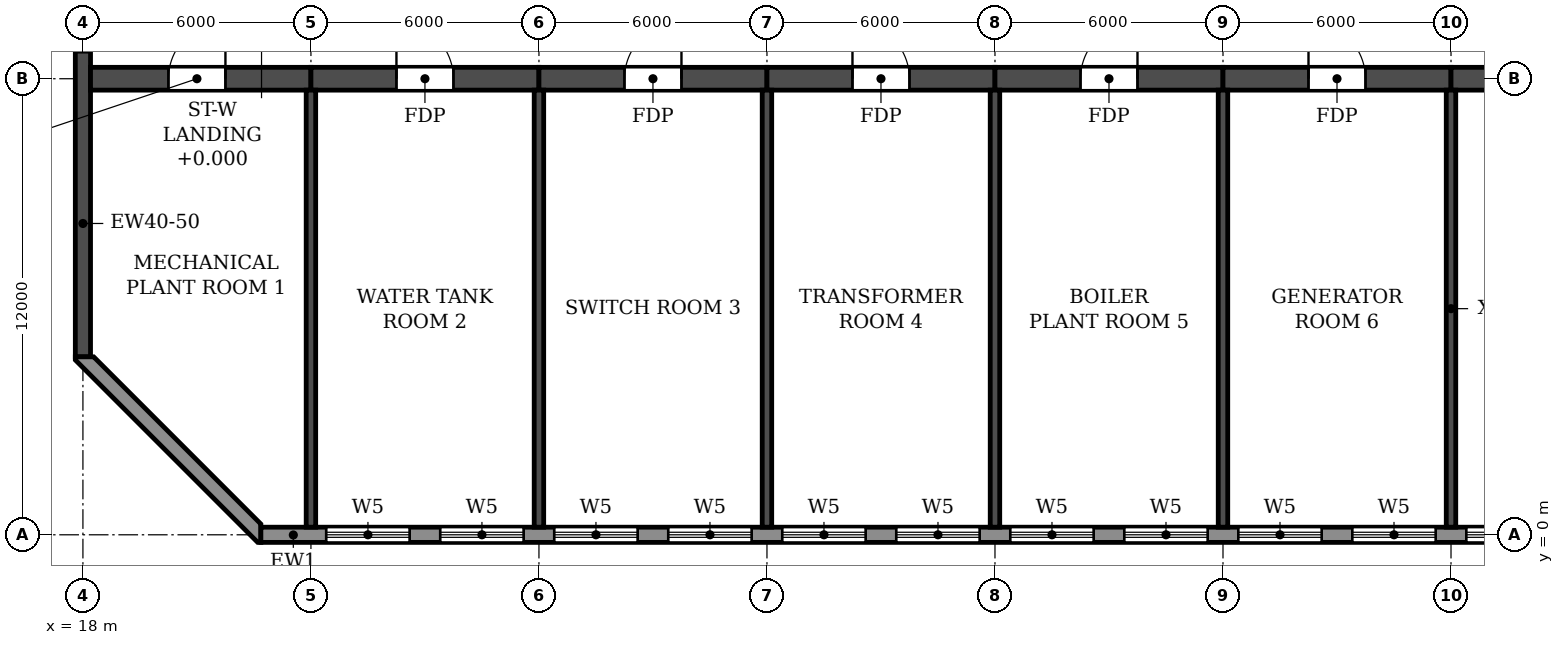
"""IFC4 building model, lengths in metres.
Left out: names, types, materials, properties, quantities, classifications, styles, units other than length and angle.
Written with IfcOpenShell. Run it as: python <this file> out.ifc"""

import sys

from ifc_helpers import new_model, si_unit, direction, frame, frame_2d, origin, place, context, subcontext, project, spatial, polyline, rectangle, outline, extrude, element, fill, save


model = new_model("IFC4")
c1 = context("Model", 3, precision=1e-05, world=origin(), true_north=direction((0.0, 1.0)))
c2 = subcontext(c1, "Body", "Model", "MODEL_VIEW")
j1 = project(units=[si_unit("LENGTHUNIT", "METRE"), si_unit("PLANEANGLEUNIT", "RADIAN")], contexts=[c1])
p1 = place(None, origin())
s1 = spatial("IfcSite", under=j1, at=p1, CompositionType="ELEMENT")
p2 = place(p1, origin())
s2 = spatial("IfcBuilding", under=s1, at=p2, CompositionType="ELEMENT")
p3 = place(p2, frame((0.0, 0.0, 214.8)))
s3 = spatial("IfcBuildingStorey", under=s2, at=p3, CompositionType="ELEMENT", Elevation=214.8)
for number, where, z_axis, x_axis in (
    (1, (24.0, 0.2, 0.0), (0.0, 0.0, 1.0), (0.0, 1.0, 0.0)),
    (2, (30.0, 0.2, 0.0), (0.0, 0.0, 1.0), (0.0, 1.0, 0.0)),
    (3, (36.0, 0.2, 0.0), (0.0, 0.0, 1.0), (0.0, 1.0, 0.0)),
    (4, (42.0, 0.2, 0.0), (0.0, 0.0, 1.0), (0.0, 1.0, 0.0)),
    (5, (48.0, 0.2, 0.0), (0.0, 0.0, 1.0), (0.0, 1.0, 0.0)),
    (6, (54.0, 0.2, 0.0), (0.0, 0.0, 1.0), (0.0, 1.0, 0.0)),
):
    element("IfcWall", number, at=place(p3, frame(where, z_axis=z_axis, x_axis=x_axis)), inside=s3, PredefinedType="SHEAR", context=c2, shape_type="SweptSolid", body=[
        extrude(rectangle(XDim=11.5, YDim=0.25, at=frame_2d((5.75, 0.0))), origin(), (0.0, 0.0, 1.0), 6.38),
    ])
p4 = place(p3, frame((18.0, 4.683, 0.0), z_axis=(0.0, 0.0, 1.0), x_axis=(0.0, 1.0, 0.0)))
e7 = element("IfcWall", 7, at=p4, inside=s3, PredefinedType="SHEAR", context=c2, shape_type="SweptSolid", body=[
    extrude(rectangle(XDim=31.834, YDim=0.4, at=frame_2d((15.917, 0.0))), origin(), (0.0, 0.0, 1.0), 6.38),
])
p5 = place(p4, frame((23.817, 0.0, 0.9)))
e8 = element("IfcOpeningElement", 8, at=p5, cuts=e7, PredefinedType="OPENING", context=c2, shape_type="SweptSolid", body=[
    extrude(rectangle(XDim=1.2, YDim=1.5, at=frame_2d((0.6, 0.75))), frame((0.0, 0.21, 0.0), z_axis=(0.0, -1.0, 0.0), x_axis=(1.0, 0.0, 0.0)), (0.0, 0.0, 1.0), 0.42),
])
p6 = place(p4, frame((8.017, 0.0, 0.9)))
e9 = element("IfcOpeningElement", 9, at=p6, cuts=e7, PredefinedType="OPENING", context=c2, shape_type="SweptSolid", body=[
    extrude(rectangle(XDim=1.2, YDim=1.5, at=frame_2d((0.6, 0.75))), frame((0.0, 0.21, 0.0), z_axis=(0.0, -1.0, 0.0), x_axis=(1.0, 0.0, 0.0)), (0.0, 0.0, 1.0), 0.42),
])
p7 = place(p4, frame((15.917, 0.0, 0.9)))
e10 = element("IfcOpeningElement", 10, at=p7, cuts=e7, PredefinedType="OPENING", context=c2, shape_type="SweptSolid", body=[
    extrude(rectangle(XDim=1.2, YDim=1.5, at=frame_2d((0.6, 0.75))), frame((0.0, 0.21, 0.0), z_axis=(0.0, -1.0, 0.0), x_axis=(1.0, 0.0, 0.0)), (0.0, 0.0, 1.0), 0.42),
])
p8 = place(p3, frame((18.2, 12.0, 0.0), z_axis=(0.0, 0.0, 1.0), x_axis=(1.0, 0.0, 0.0)))
e11 = element("IfcWall", 11, at=p8, inside=s3, PredefinedType="SHEAR", context=c2, shape_type="SweptSolid", body=[
    extrude(rectangle(XDim=5.8, YDim=0.6, at=frame_2d((2.9, 0.0))), origin(), (0.0, 0.0, 1.0), 6.38),
])
p9 = place(p8, frame((2.05, 0.0, 0.0)))
e12 = element("IfcOpeningElement", 12, at=p9, cuts=e11, PredefinedType="OPENING", context=c2, shape_type="SweptSolid", body=[
    extrude(rectangle(XDim=1.5, YDim=2.1, at=frame_2d((0.75, 1.05))), frame((0.0, 0.31, 0.0), z_axis=(0.0, -1.0, 0.0), x_axis=(1.0, 0.0, 0.0)), (0.0, 0.0, 1.0), 0.62),
])
p10 = place(p3, frame((24.0, 12.0, 0.0), z_axis=(0.0, 0.0, 1.0), x_axis=(1.0, 0.0, 0.0)))
e13 = element("IfcWall", 13, at=p10, inside=s3, PredefinedType="SHEAR", context=c2, shape_type="SweptSolid", body=[
    extrude(rectangle(XDim=6.0, YDim=0.6, at=frame_2d((3.0, 0.0))), origin(), (0.0, 0.0, 1.0), 6.38),
])
p11 = place(p10, frame((2.25, 0.0, 0.0)))
e14 = element("IfcOpeningElement", 14, at=p11, cuts=e13, PredefinedType="OPENING", context=c2, shape_type="SweptSolid", body=[
    extrude(rectangle(XDim=1.5, YDim=2.1, at=frame_2d((0.75, 1.05))), frame((0.0, 0.31, 0.0), z_axis=(0.0, -1.0, 0.0), x_axis=(1.0, 0.0, 0.0)), (0.0, 0.0, 1.0), 0.62),
])
p12 = place(p3, frame((30.0, 12.0, 0.0), z_axis=(0.0, 0.0, 1.0), x_axis=(1.0, 0.0, 0.0)))
e15 = element("IfcWall", 15, at=p12, inside=s3, PredefinedType="SHEAR", context=c2, shape_type="SweptSolid", body=[
    extrude(rectangle(XDim=6.0, YDim=0.6, at=frame_2d((3.0, 0.0))), origin(), (0.0, 0.0, 1.0), 6.38),
])
p13 = place(p12, frame((2.25, 0.0, 0.0)))
e16 = element("IfcOpeningElement", 16, at=p13, cuts=e15, PredefinedType="OPENING", context=c2, shape_type="SweptSolid", body=[
    extrude(rectangle(XDim=1.5, YDim=2.1, at=frame_2d((0.75, 1.05))), frame((0.0, 0.31, 0.0), z_axis=(0.0, -1.0, 0.0), x_axis=(1.0, 0.0, 0.0)), (0.0, 0.0, 1.0), 0.62),
])
p14 = place(p3, frame((36.0, 12.0, 0.0), z_axis=(0.0, 0.0, 1.0), x_axis=(1.0, 0.0, 0.0)))
e17 = element("IfcWall", 17, at=p14, inside=s3, PredefinedType="SHEAR", context=c2, shape_type="SweptSolid", body=[
    extrude(rectangle(XDim=6.0, YDim=0.6, at=frame_2d((3.0, 0.0))), origin(), (0.0, 0.0, 1.0), 6.38),
])
p15 = place(p14, frame((2.25, 0.0, 0.0)))
e18 = element("IfcOpeningElement", 18, at=p15, cuts=e17, PredefinedType="OPENING", context=c2, shape_type="SweptSolid", body=[
    extrude(rectangle(XDim=1.5, YDim=2.1, at=frame_2d((0.75, 1.05))), frame((0.0, 0.31, 0.0), z_axis=(0.0, -1.0, 0.0), x_axis=(1.0, 0.0, 0.0)), (0.0, 0.0, 1.0), 0.62),
])
p16 = place(p3, frame((42.0, 12.0, 0.0), z_axis=(0.0, 0.0, 1.0), x_axis=(1.0, 0.0, 0.0)))
e19 = element("IfcWall", 19, at=p16, inside=s3, PredefinedType="SHEAR", context=c2, shape_type="SweptSolid", body=[
    extrude(rectangle(XDim=6.0, YDim=0.6, at=frame_2d((3.0, 0.0))), origin(), (0.0, 0.0, 1.0), 6.38),
])
p17 = place(p16, frame((2.25, 0.0, 0.0)))
e20 = element("IfcOpeningElement", 20, at=p17, cuts=e19, PredefinedType="OPENING", context=c2, shape_type="SweptSolid", body=[
    extrude(rectangle(XDim=1.5, YDim=2.1, at=frame_2d((0.75, 1.05))), frame((0.0, 0.31, 0.0), z_axis=(0.0, -1.0, 0.0), x_axis=(1.0, 0.0, 0.0)), (0.0, 0.0, 1.0), 0.62),
])
p18 = place(p3, frame((48.0, 12.0, 0.0), z_axis=(0.0, 0.0, 1.0), x_axis=(1.0, 0.0, 0.0)))
e21 = element("IfcWall", 21, at=p18, inside=s3, PredefinedType="SHEAR", context=c2, shape_type="SweptSolid", body=[
    extrude(rectangle(XDim=6.0, YDim=0.6, at=frame_2d((3.0, 0.0))), origin(), (0.0, 0.0, 1.0), 6.38),
])
p19 = place(p18, frame((2.25, 0.0, 0.0)))
e22 = element("IfcOpeningElement", 22, at=p19, cuts=e21, PredefinedType="OPENING", context=c2, shape_type="SweptSolid", body=[
    extrude(rectangle(XDim=1.5, YDim=2.1, at=frame_2d((0.75, 1.05))), frame((0.0, 0.31, 0.0), z_axis=(0.0, -1.0, 0.0), x_axis=(1.0, 0.0, 0.0)), (0.0, 0.0, 1.0), 0.62),
])
p20 = place(p3, frame((54.0, 12.0, 0.0), z_axis=(0.0, 0.0, 1.0), x_axis=(1.0, 0.0, 0.0)))
e23 = element("IfcWall", 23, at=p20, inside=s3, PredefinedType="SHEAR", context=c2, shape_type="SweptSolid", body=[
    extrude(rectangle(XDim=6.0, YDim=0.6, at=frame_2d((3.0, 0.0))), origin(), (0.0, 0.0, 1.0), 6.38),
])
p21 = place(p20, frame((2.25, 0.0, 0.0)))
e24 = element("IfcOpeningElement", 24, at=p21, cuts=e23, PredefinedType="OPENING", context=c2, shape_type="SweptSolid", body=[
    extrude(rectangle(XDim=1.5, YDim=2.1, at=frame_2d((0.75, 1.05))), frame((0.0, 0.31, 0.0), z_axis=(0.0, -1.0, 0.0), x_axis=(1.0, 0.0, 0.0)), (0.0, 0.0, 1.0), 0.62),
])
p22 = place(p3, frame((22.683, 0.0, 0.0), z_axis=(0.0, 0.0, 1.0), x_axis=(1.0, 0.0, 0.0)))
e25 = element("IfcWall", 25, at=p22, inside=s3, PredefinedType="STANDARD", context=c2, shape_type="SweptSolid", body=[
    extrude(rectangle(XDim=56.634, YDim=0.4, at=frame_2d((28.317, 0.0))), origin(), (0.0, 0.0, 1.0), 6.38),
])
p23 = place(p22, frame((1.717, 0.0, 0.6)))
e26 = element("IfcOpeningElement", 26, at=p23, cuts=e25, PredefinedType="OPENING", context=c2, shape_type="SweptSolid", body=[
    extrude(rectangle(XDim=2.2, YDim=2.4, at=frame_2d((1.1, 1.2))), frame((0.0, 0.21, 0.0), z_axis=(0.0, -1.0, 0.0), x_axis=(1.0, 0.0, 0.0)), (0.0, 0.0, 1.0), 0.42),
])
p24 = place(p22, frame((4.717, 0.0, 0.6)))
e27 = element("IfcOpeningElement", 27, at=p24, cuts=e25, PredefinedType="OPENING", context=c2, shape_type="SweptSolid", body=[
    extrude(rectangle(XDim=2.2, YDim=2.4, at=frame_2d((1.1, 1.2))), frame((0.0, 0.21, 0.0), z_axis=(0.0, -1.0, 0.0), x_axis=(1.0, 0.0, 0.0)), (0.0, 0.0, 1.0), 0.42),
])
p25 = place(p22, frame((7.717, 0.0, 0.6)))
e28 = element("IfcOpeningElement", 28, at=p25, cuts=e25, PredefinedType="OPENING", context=c2, shape_type="SweptSolid", body=[
    extrude(rectangle(XDim=2.2, YDim=2.4, at=frame_2d((1.1, 1.2))), frame((0.0, 0.21, 0.0), z_axis=(0.0, -1.0, 0.0), x_axis=(1.0, 0.0, 0.0)), (0.0, 0.0, 1.0), 0.42),
])
p26 = place(p22, frame((10.717, 0.0, 0.6)))
e29 = element("IfcOpeningElement", 29, at=p26, cuts=e25, PredefinedType="OPENING", context=c2, shape_type="SweptSolid", body=[
    extrude(rectangle(XDim=2.2, YDim=2.4, at=frame_2d((1.1, 1.2))), frame((0.0, 0.21, 0.0), z_axis=(0.0, -1.0, 0.0), x_axis=(1.0, 0.0, 0.0)), (0.0, 0.0, 1.0), 0.42),
])
p27 = place(p22, frame((13.717, 0.0, 0.6)))
e30 = element("IfcOpeningElement", 30, at=p27, cuts=e25, PredefinedType="OPENING", context=c2, shape_type="SweptSolid", body=[
    extrude(rectangle(XDim=2.2, YDim=2.4, at=frame_2d((1.1, 1.2))), frame((0.0, 0.21, 0.0), z_axis=(0.0, -1.0, 0.0), x_axis=(1.0, 0.0, 0.0)), (0.0, 0.0, 1.0), 0.42),
])
p28 = place(p22, frame((16.717, 0.0, 0.6)))
e31 = element("IfcOpeningElement", 31, at=p28, cuts=e25, PredefinedType="OPENING", context=c2, shape_type="SweptSolid", body=[
    extrude(rectangle(XDim=2.2, YDim=2.4, at=frame_2d((1.1, 1.2))), frame((0.0, 0.21, 0.0), z_axis=(0.0, -1.0, 0.0), x_axis=(1.0, 0.0, 0.0)), (0.0, 0.0, 1.0), 0.42),
])
p29 = place(p22, frame((19.717, 0.0, 0.6)))
e32 = element("IfcOpeningElement", 32, at=p29, cuts=e25, PredefinedType="OPENING", context=c2, shape_type="SweptSolid", body=[
    extrude(rectangle(XDim=2.2, YDim=2.4, at=frame_2d((1.1, 1.2))), frame((0.0, 0.21, 0.0), z_axis=(0.0, -1.0, 0.0), x_axis=(1.0, 0.0, 0.0)), (0.0, 0.0, 1.0), 0.42),
])
p30 = place(p22, frame((22.717, 0.0, 0.6)))
e33 = element("IfcOpeningElement", 33, at=p30, cuts=e25, PredefinedType="OPENING", context=c2, shape_type="SweptSolid", body=[
    extrude(rectangle(XDim=2.2, YDim=2.4, at=frame_2d((1.1, 1.2))), frame((0.0, 0.21, 0.0), z_axis=(0.0, -1.0, 0.0), x_axis=(1.0, 0.0, 0.0)), (0.0, 0.0, 1.0), 0.42),
])
p31 = place(p22, frame((25.717, 0.0, 0.6)))
e34 = element("IfcOpeningElement", 34, at=p31, cuts=e25, PredefinedType="OPENING", context=c2, shape_type="SweptSolid", body=[
    extrude(rectangle(XDim=2.2, YDim=2.4, at=frame_2d((1.1, 1.2))), frame((0.0, 0.21, 0.0), z_axis=(0.0, -1.0, 0.0), x_axis=(1.0, 0.0, 0.0)), (0.0, 0.0, 1.0), 0.42),
])
p32 = place(p22, frame((28.717, 0.0, 0.6)))
e35 = element("IfcOpeningElement", 35, at=p32, cuts=e25, PredefinedType="OPENING", context=c2, shape_type="SweptSolid", body=[
    extrude(rectangle(XDim=2.2, YDim=2.4, at=frame_2d((1.1, 1.2))), frame((0.0, 0.21, 0.0), z_axis=(0.0, -1.0, 0.0), x_axis=(1.0, 0.0, 0.0)), (0.0, 0.0, 1.0), 0.42),
])
p33 = place(p22, frame((31.717, 0.0, 0.6)))
e36 = element("IfcOpeningElement", 36, at=p33, cuts=e25, PredefinedType="OPENING", context=c2, shape_type="SweptSolid", body=[
    extrude(rectangle(XDim=2.2, YDim=2.4, at=frame_2d((1.1, 1.2))), frame((0.0, 0.21, 0.0), z_axis=(0.0, -1.0, 0.0), x_axis=(1.0, 0.0, 0.0)), (0.0, 0.0, 1.0), 0.42),
])
p34 = place(p22, frame((34.717, 0.0, 0.6)))
e37 = element("IfcOpeningElement", 37, at=p34, cuts=e25, PredefinedType="OPENING", context=c2, shape_type="SweptSolid", body=[
    extrude(rectangle(XDim=2.2, YDim=2.4, at=frame_2d((1.1, 1.2))), frame((0.0, 0.21, 0.0), z_axis=(0.0, -1.0, 0.0), x_axis=(1.0, 0.0, 0.0)), (0.0, 0.0, 1.0), 0.42),
])
p35 = place(p22, frame((37.717, 0.0, 0.6)))
e38 = element("IfcOpeningElement", 38, at=p35, cuts=e25, PredefinedType="OPENING", context=c2, shape_type="SweptSolid", body=[
    extrude(rectangle(XDim=2.2, YDim=2.4, at=frame_2d((1.1, 1.2))), frame((0.0, 0.21, 0.0), z_axis=(0.0, -1.0, 0.0), x_axis=(1.0, 0.0, 0.0)), (0.0, 0.0, 1.0), 0.42),
])
p36 = place(p22, frame((40.717, 0.0, 0.6)))
e39 = element("IfcOpeningElement", 39, at=p36, cuts=e25, PredefinedType="OPENING", context=c2, shape_type="SweptSolid", body=[
    extrude(rectangle(XDim=2.2, YDim=2.4, at=frame_2d((1.1, 1.2))), frame((0.0, 0.21, 0.0), z_axis=(0.0, -1.0, 0.0), x_axis=(1.0, 0.0, 0.0)), (0.0, 0.0, 1.0), 0.42),
])
p37 = place(p22, frame((43.717, 0.0, 0.6)))
e40 = element("IfcOpeningElement", 40, at=p37, cuts=e25, PredefinedType="OPENING", context=c2, shape_type="SweptSolid", body=[
    extrude(rectangle(XDim=2.2, YDim=2.4, at=frame_2d((1.1, 1.2))), frame((0.0, 0.21, 0.0), z_axis=(0.0, -1.0, 0.0), x_axis=(1.0, 0.0, 0.0)), (0.0, 0.0, 1.0), 0.42),
])
p38 = place(p22, frame((46.717, 0.0, 0.6)))
e41 = element("IfcOpeningElement", 41, at=p38, cuts=e25, PredefinedType="OPENING", context=c2, shape_type="SweptSolid", body=[
    extrude(rectangle(XDim=2.2, YDim=2.4, at=frame_2d((1.1, 1.2))), frame((0.0, 0.21, 0.0), z_axis=(0.0, -1.0, 0.0), x_axis=(1.0, 0.0, 0.0)), (0.0, 0.0, 1.0), 0.42),
])
p39 = place(p22, frame((49.717, 0.0, 0.6)))
e42 = element("IfcOpeningElement", 42, at=p39, cuts=e25, PredefinedType="OPENING", context=c2, shape_type="SweptSolid", body=[
    extrude(rectangle(XDim=2.2, YDim=2.4, at=frame_2d((1.1, 1.2))), frame((0.0, 0.21, 0.0), z_axis=(0.0, -1.0, 0.0), x_axis=(1.0, 0.0, 0.0)), (0.0, 0.0, 1.0), 0.42),
])
p40 = place(p22, frame((52.717, 0.0, 0.6)))
e43 = element("IfcOpeningElement", 43, at=p40, cuts=e25, PredefinedType="OPENING", context=c2, shape_type="SweptSolid", body=[
    extrude(rectangle(XDim=2.2, YDim=2.4, at=frame_2d((1.1, 1.2))), frame((0.0, 0.21, 0.0), z_axis=(0.0, -1.0, 0.0), x_axis=(1.0, 0.0, 0.0)), (0.0, 0.0, 1.0), 0.42),
])
p41 = place(p3, origin())
e44 = element("IfcWall", 44, at=p41, inside=s3, PredefinedType="STANDARD", context=c2, shape_type="SweptSolid", body=[
    extrude(outline(polyline([(17.8, 4.683), (17.8, 4.6), (22.6, -0.2), (22.683, -0.2), (22.683, 0.283), (18.283, 4.683), (17.8, 4.683)])), origin(), (0.0, 0.0, 1.0), 6.38),
])
p42 = place(p23, origin())
e45 = element("IfcWindow", 45, at=p42, inside=s3, PartitioningType="TRIPLE_PANEL_HORIZONTAL", PredefinedType="WINDOW", context=c2, shape_type="SweptSolid", body=[
    extrude(rectangle(XDim=2.2, YDim=2.4, at=frame_2d((1.1, 1.2))), frame((0.0, 0.03, 0.0), z_axis=(0.0, -1.0, 0.0), x_axis=(1.0, 0.0, 0.0)), (0.0, 0.0, 1.0), 0.06),
])
fill(e26, e45)
p43 = place(p24, origin())
e46 = element("IfcWindow", 46, at=p43, inside=s3, PartitioningType="TRIPLE_PANEL_HORIZONTAL", PredefinedType="WINDOW", context=c2, shape_type="SweptSolid", body=[
    extrude(rectangle(XDim=2.2, YDim=2.4, at=frame_2d((1.1, 1.2))), frame((0.0, 0.03, 0.0), z_axis=(0.0, -1.0, 0.0), x_axis=(1.0, 0.0, 0.0)), (0.0, 0.0, 1.0), 0.06),
])
fill(e27, e46)
p44 = place(p25, origin())
e47 = element("IfcWindow", 47, at=p44, inside=s3, PartitioningType="TRIPLE_PANEL_HORIZONTAL", PredefinedType="WINDOW", context=c2, shape_type="SweptSolid", body=[
    extrude(rectangle(XDim=2.2, YDim=2.4, at=frame_2d((1.1, 1.2))), frame((0.0, 0.03, 0.0), z_axis=(0.0, -1.0, 0.0), x_axis=(1.0, 0.0, 0.0)), (0.0, 0.0, 1.0), 0.06),
])
fill(e28, e47)
p45 = place(p26, origin())
e48 = element("IfcWindow", 48, at=p45, inside=s3, PartitioningType="TRIPLE_PANEL_HORIZONTAL", PredefinedType="WINDOW", context=c2, shape_type="SweptSolid", body=[
    extrude(rectangle(XDim=2.2, YDim=2.4, at=frame_2d((1.1, 1.2))), frame((0.0, 0.03, 0.0), z_axis=(0.0, -1.0, 0.0), x_axis=(1.0, 0.0, 0.0)), (0.0, 0.0, 1.0), 0.06),
])
fill(e29, e48)
p46 = place(p27, origin())
e49 = element("IfcWindow", 49, at=p46, inside=s3, PartitioningType="TRIPLE_PANEL_HORIZONTAL", PredefinedType="WINDOW", context=c2, shape_type="SweptSolid", body=[
    extrude(rectangle(XDim=2.2, YDim=2.4, at=frame_2d((1.1, 1.2))), frame((0.0, 0.03, 0.0), z_axis=(0.0, -1.0, 0.0), x_axis=(1.0, 0.0, 0.0)), (0.0, 0.0, 1.0), 0.06),
])
fill(e30, e49)
p47 = place(p28, origin())
e50 = element("IfcWindow", 50, at=p47, inside=s3, PartitioningType="TRIPLE_PANEL_HORIZONTAL", PredefinedType="WINDOW", context=c2, shape_type="SweptSolid", body=[
    extrude(rectangle(XDim=2.2, YDim=2.4, at=frame_2d((1.1, 1.2))), frame((0.0, 0.03, 0.0), z_axis=(0.0, -1.0, 0.0), x_axis=(1.0, 0.0, 0.0)), (0.0, 0.0, 1.0), 0.06),
])
fill(e31, e50)
p48 = place(p29, origin())
e51 = element("IfcWindow", 51, at=p48, inside=s3, PartitioningType="TRIPLE_PANEL_HORIZONTAL", PredefinedType="WINDOW", context=c2, shape_type="SweptSolid", body=[
    extrude(rectangle(XDim=2.2, YDim=2.4, at=frame_2d((1.1, 1.2))), frame((0.0, 0.03, 0.0), z_axis=(0.0, -1.0, 0.0), x_axis=(1.0, 0.0, 0.0)), (0.0, 0.0, 1.0), 0.06),
])
fill(e32, e51)
p49 = place(p30, origin())
e52 = element("IfcWindow", 52, at=p49, inside=s3, PartitioningType="TRIPLE_PANEL_HORIZONTAL", PredefinedType="WINDOW", context=c2, shape_type="SweptSolid", body=[
    extrude(rectangle(XDim=2.2, YDim=2.4, at=frame_2d((1.1, 1.2))), frame((0.0, 0.03, 0.0), z_axis=(0.0, -1.0, 0.0), x_axis=(1.0, 0.0, 0.0)), (0.0, 0.0, 1.0), 0.06),
])
fill(e33, e52)
p50 = place(p31, origin())
e53 = element("IfcWindow", 53, at=p50, inside=s3, PartitioningType="TRIPLE_PANEL_HORIZONTAL", PredefinedType="WINDOW", context=c2, shape_type="SweptSolid", body=[
    extrude(rectangle(XDim=2.2, YDim=2.4, at=frame_2d((1.1, 1.2))), frame((0.0, 0.03, 0.0), z_axis=(0.0, -1.0, 0.0), x_axis=(1.0, 0.0, 0.0)), (0.0, 0.0, 1.0), 0.06),
])
fill(e34, e53)
p51 = place(p32, origin())
e54 = element("IfcWindow", 54, at=p51, inside=s3, PartitioningType="TRIPLE_PANEL_HORIZONTAL", PredefinedType="WINDOW", context=c2, shape_type="SweptSolid", body=[
    extrude(rectangle(XDim=2.2, YDim=2.4, at=frame_2d((1.1, 1.2))), frame((0.0, 0.03, 0.0), z_axis=(0.0, -1.0, 0.0), x_axis=(1.0, 0.0, 0.0)), (0.0, 0.0, 1.0), 0.06),
])
fill(e35, e54)
p52 = place(p33, origin())
e55 = element("IfcWindow", 55, at=p52, inside=s3, PartitioningType="TRIPLE_PANEL_HORIZONTAL", PredefinedType="WINDOW", context=c2, shape_type="SweptSolid", body=[
    extrude(rectangle(XDim=2.2, YDim=2.4, at=frame_2d((1.1, 1.2))), frame((0.0, 0.03, 0.0), z_axis=(0.0, -1.0, 0.0), x_axis=(1.0, 0.0, 0.0)), (0.0, 0.0, 1.0), 0.06),
])
fill(e36, e55)
p53 = place(p9, origin())
e56 = element("IfcDoor", 56, at=p53, inside=s3, OperationType="DOUBLE_DOOR_SINGLE_SWING", PredefinedType="DOOR", context=c2, shape_type="SweptSolid", body=[
    extrude(rectangle(XDim=1.5, YDim=2.1, at=frame_2d((0.75, 1.05))), frame((0.0, 0.025, 0.0), z_axis=(0.0, -1.0, 0.0), x_axis=(1.0, 0.0, 0.0)), (0.0, 0.0, 1.0), 0.05),
])
fill(e12, e56)
p54 = place(p11, origin())
e57 = element("IfcDoor", 57, at=p54, inside=s3, OperationType="DOUBLE_DOOR_SINGLE_SWING", PredefinedType="DOOR", context=c2, shape_type="SweptSolid", body=[
    extrude(rectangle(XDim=1.5, YDim=2.1, at=frame_2d((0.75, 1.05))), frame((0.0, 0.025, 0.0), z_axis=(0.0, -1.0, 0.0), x_axis=(1.0, 0.0, 0.0)), (0.0, 0.0, 1.0), 0.05),
])
fill(e14, e57)
p55 = place(p13, origin())
e58 = element("IfcDoor", 58, at=p55, inside=s3, OperationType="DOUBLE_DOOR_SINGLE_SWING", PredefinedType="DOOR", context=c2, shape_type="SweptSolid", body=[
    extrude(rectangle(XDim=1.5, YDim=2.1, at=frame_2d((0.75, 1.05))), frame((0.0, 0.025, 0.0), z_axis=(0.0, -1.0, 0.0), x_axis=(1.0, 0.0, 0.0)), (0.0, 0.0, 1.0), 0.05),
])
fill(e16, e58)
p56 = place(p15, origin())
e59 = element("IfcDoor", 59, at=p56, inside=s3, OperationType="DOUBLE_DOOR_SINGLE_SWING", PredefinedType="DOOR", context=c2, shape_type="SweptSolid", body=[
    extrude(rectangle(XDim=1.5, YDim=2.1, at=frame_2d((0.75, 1.05))), frame((0.0, 0.025, 0.0), z_axis=(0.0, -1.0, 0.0), x_axis=(1.0, 0.0, 0.0)), (0.0, 0.0, 1.0), 0.05),
])
fill(e18, e59)
p57 = place(p17, origin())
e60 = element("IfcDoor", 60, at=p57, inside=s3, OperationType="DOUBLE_DOOR_SINGLE_SWING", PredefinedType="DOOR", context=c2, shape_type="SweptSolid", body=[
    extrude(rectangle(XDim=1.5, YDim=2.1, at=frame_2d((0.75, 1.05))), frame((0.0, 0.025, 0.0), z_axis=(0.0, -1.0, 0.0), x_axis=(1.0, 0.0, 0.0)), (0.0, 0.0, 1.0), 0.05),
])
fill(e20, e60)
p58 = place(p19, origin())
e61 = element("IfcDoor", 61, at=p58, inside=s3, OperationType="DOUBLE_DOOR_SINGLE_SWING", PredefinedType="DOOR", context=c2, shape_type="SweptSolid", body=[
    extrude(rectangle(XDim=1.5, YDim=2.1, at=frame_2d((0.75, 1.05))), frame((0.0, 0.025, 0.0), z_axis=(0.0, -1.0, 0.0), x_axis=(1.0, 0.0, 0.0)), (0.0, 0.0, 1.0), 0.05),
])
fill(e22, e61)
save(model, sys.argv[1])
